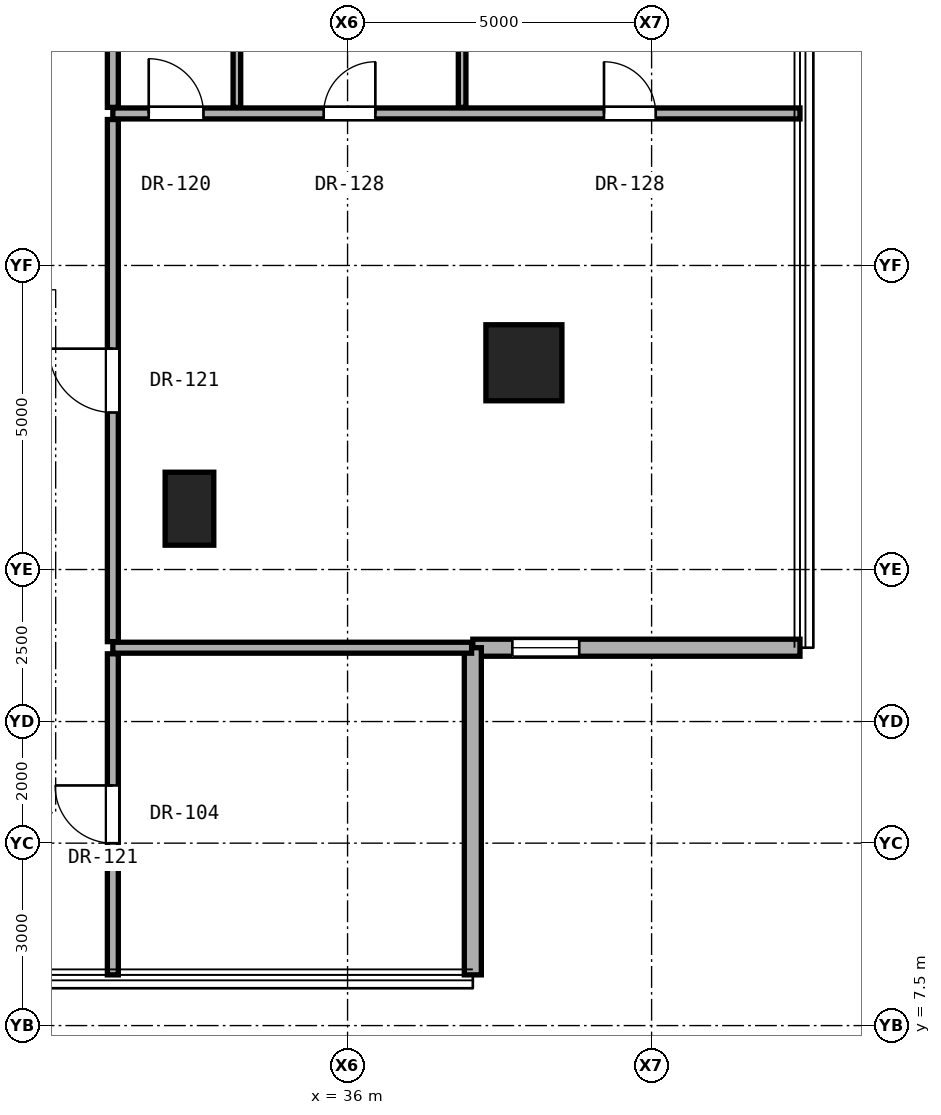
"""IFC4 building model, lengths in metres.
Left out: names, types, materials, properties, quantities, classifications, styles, units other than length and angle.
Written with IfcOpenShell. Run it as: python <this file> out.ifc"""

import sys

from ifc_helpers import new_model, si_unit, direction, frame, frame_2d, origin, origin_2d, place, context, subcontext, project, spatial, rectangle, hollow_rectangle, extrude, element, fill, save


model = new_model("IFC4")
c1 = context("Model", 3, precision=1e-05, world=origin(), true_north=direction((0.0, 1.0)))
c2 = subcontext(c1, "Body", "Model", "MODEL_VIEW")
j1 = project(units=[si_unit("LENGTHUNIT", "METRE"), si_unit("PLANEANGLEUNIT", "RADIAN")], contexts=[c1])
p1 = place(None, origin())
s1 = spatial("IfcSite", under=j1, at=p1, CompositionType="ELEMENT")
p2 = place(p1, origin())
s2 = spatial("IfcBuilding", under=s1, at=p2, CompositionType="ELEMENT")
p3 = place(p2, frame((0.0, 0.0, 45.5)))
s3 = spatial("IfcBuildingStorey", under=s2, at=p3, CompositionType="ELEMENT", Elevation=45.5)
p4 = place(p3, frame((38.9, 18.4, 0.0), z_axis=(0.0, 0.0, 1.0), x_axis=(1.0, 0.0, 0.0)))
e1 = element("IfcColumn", 1, at=p4, inside=s3, PredefinedType="COLUMN", context=c2, shape_type="SweptSolid", body=[
    extrude(hollow_rectangle(XDim=1.25, YDim=1.25, WallThickness=0.07, at=origin_2d()), origin(), (0.0, 0.0, 1.0), 3.3),
])
p5 = place(p3, frame((33.4, 16.0, 0.0), z_axis=(0.0, 0.0, 1.0), x_axis=(1.0, 0.0, 0.0)))
e2 = element("IfcColumn", 2, at=p5, inside=s3, PredefinedType="PILASTER", context=c2, shape_type="SweptSolid", body=[
    extrude(rectangle(XDim=0.8, YDim=1.2, at=origin_2d()), origin(), (0.0, 0.0, 1.0), 3.3),
])
p6 = place(p3, frame((38.06, 13.714, 0.0), z_axis=(0.0, 0.0, 1.0), x_axis=(1.0, 0.0, 0.0)))
e3 = element("IfcWall", 3, at=p6, inside=s3, PredefinedType="SOLIDWALL", context=c2, shape_type="SweptSolid", body=[
    extrude(rectangle(XDim=5.38, YDim=0.28, at=frame_2d((2.69, 0.0))), origin(), (0.0, 0.0, 1.0), 3.04),
])
p7 = place(p6, frame((0.65, 0.0, 0.85)))
e4 = element("IfcOpeningElement", 4, at=p7, cuts=e3, PredefinedType="OPENING", context=c2, shape_type="SweptSolid", body=[
    extrude(rectangle(XDim=1.1, YDim=2.0, at=frame_2d((0.55, 1.0))), frame((0.0, 0.15, 0.0), z_axis=(0.0, -1.0, 0.0), x_axis=(1.0, 0.0, 0.0)), (0.0, 0.0, 1.0), 0.3),
])
p8 = place(p3, frame((38.06, 8.334, 0.0), z_axis=(0.0, 0.0, 1.0), x_axis=(0.0, 1.0, 0.0)))
e5 = element("IfcWall", 5, at=p8, inside=s3, PredefinedType="SOLIDWALL", context=c2, shape_type="SweptSolid", body=[
    extrude(rectangle(XDim=5.38, YDim=0.28, at=frame_2d((2.69, 0.0))), origin(), (0.0, 0.0, 1.0), 3.04),
])
p9 = place(p3, frame((32.14, 13.714, 0.0), z_axis=(0.0, 0.0, 1.0), x_axis=(1.0, 0.0, 0.0)))
e6 = element("IfcWall", 6, at=p9, inside=s3, PredefinedType="PARTITIONING", context=c2, shape_type="SweptSolid", body=[
    extrude(rectangle(XDim=5.9, YDim=0.18, at=frame_2d((2.95, 0.0))), origin(), (0.0, 0.0, 1.0), 3.06),
])
p10 = place(p3, frame((32.14, 22.5, 0.0), z_axis=(0.0, 0.0, 1.0), x_axis=(1.0, 0.0, 0.0)))
e7 = element("IfcWall", 7, at=p10, inside=s3, PredefinedType="PARTITIONING", context=c2, shape_type="SweptSolid", body=[
    extrude(rectangle(XDim=11.3, YDim=0.18, at=frame_2d((5.65, 0.0))), origin(), (0.0, 0.0, 1.0), 2.125),
])
p11 = place(p10, frame((8.077, 0.0, 0.0)))
e8 = element("IfcOpeningElement", 8, at=p11, cuts=e7, PredefinedType="OPENING", context=c2, shape_type="SweptSolid", body=[
    extrude(rectangle(XDim=0.85, YDim=2.01, at=frame_2d((0.425, 1.005))), frame((0.0, 0.1, 0.0), z_axis=(0.0, -1.0, 0.0), x_axis=(1.0, 0.0, 0.0)), (0.0, 0.0, 1.0), 0.2),
])
p12 = place(p10, frame((3.467, 0.0, 0.0)))
e9 = element("IfcOpeningElement", 9, at=p12, cuts=e7, PredefinedType="OPENING", context=c2, shape_type="SweptSolid", body=[
    extrude(rectangle(XDim=0.85, YDim=2.01, at=frame_2d((0.425, 1.005))), frame((0.0, 0.1, 0.0), z_axis=(0.0, -1.0, 0.0), x_axis=(1.0, 0.0, 0.0)), (0.0, 0.0, 1.0), 0.2),
])
p13 = place(p10, frame((0.59, 0.0, 0.0)))
e10 = element("IfcOpeningElement", 10, at=p13, cuts=e7, PredefinedType="OPENING", context=c2, shape_type="SweptSolid", body=[
    extrude(rectangle(XDim=0.9, YDim=2.1, at=frame_2d((0.45, 1.05))), frame((0.0, 0.1, 0.0), z_axis=(0.0, -1.0, 0.0), x_axis=(1.0, 0.0, 0.0)), (0.0, 0.0, 1.0), 0.2),
])
p14 = place(p3, frame((32.14, 8.334, 0.0), z_axis=(0.0, 0.0, 1.0), x_axis=(0.0, 1.0, 0.0)))
e11 = element("IfcWall", 11, at=p14, inside=s3, PredefinedType="PARTITIONING", context=c2, shape_type="SweptSolid", body=[
    extrude(rectangle(XDim=5.28, YDim=0.18, at=frame_2d((2.64, 0.0))), origin(), (0.0, 0.0, 1.0), 3.06),
])
p15 = place(p14, frame((2.165, 0.0, 0.0)))
e12 = element("IfcOpeningElement", 12, at=p15, cuts=e11, PredefinedType="OPENING", context=c2, shape_type="SweptSolid", body=[
    extrude(rectangle(XDim=0.95, YDim=2.15, at=frame_2d((0.475, 1.075))), frame((0.0, 0.1, 0.0), z_axis=(0.0, -1.0, 0.0), x_axis=(1.0, 0.0, 0.0)), (0.0, 0.0, 1.0), 0.2),
])
p16 = place(p3, frame((32.14, 13.814, 0.0), z_axis=(0.0, 0.0, 1.0), x_axis=(0.0, 1.0, 0.0)))
e13 = element("IfcWall", 13, at=p16, inside=s3, PredefinedType="PARTITIONING", context=c2, shape_type="SweptSolid", body=[
    extrude(rectangle(XDim=8.586, YDim=0.18, at=frame_2d((4.293, 0.0))), origin(), (0.0, 0.0, 1.0), 2.436),
])
p17 = place(p16, frame((3.768, 0.0, 0.0)))
e14 = element("IfcOpeningElement", 14, at=p17, cuts=e13, PredefinedType="OPENING", context=c2, shape_type="SweptSolid", body=[
    extrude(rectangle(XDim=1.05, YDim=2.2, at=frame_2d((0.525, 1.1))), frame((0.0, 0.1, 0.0), z_axis=(0.0, -1.0, 0.0), x_axis=(1.0, 0.0, 0.0)), (0.0, 0.0, 1.0), 0.2),
])
p18 = place(p3, frame((32.14, 22.6, 0.0), z_axis=(0.0, 0.0, 1.0), x_axis=(0.0, 1.0, 0.0)))
e15 = element("IfcWall", 15, at=p18, inside=s3, PredefinedType="PARTITIONING", context=c2, shape_type="SweptSolid", body=[
    extrude(rectangle(XDim=2.127, YDim=0.18, at=frame_2d((1.064, 0.0))), origin(), (0.0, 0.0, 1.0), 2.279),
])
for number, where, z_axis, x_axis in (
    (16, (34.18, 22.6, 0.0), (0.0, 0.0, 1.0), (0.0, 1.0, 0.0)),
    (17, (37.884, 22.6, 0.0), (0.0, 0.0, 1.0), (0.0, 1.0, 0.0)),
):
    element("IfcWall", number, at=place(p3, frame(where, z_axis=z_axis, x_axis=x_axis)), inside=s3, PredefinedType="PARTITIONING", context=c2, shape_type="SweptSolid", body=[
        extrude(rectangle(XDim=2.127, YDim=0.125, at=frame_2d((1.064, 0.0))), origin(), (0.0, 0.0, 1.0), 2.279),
    ])
p19 = place(p7, origin())
e18 = element("IfcWindow", 18, at=p19, inside=s3, PartitioningType="SINGLE_PANEL", PredefinedType="WINDOW", context=c2, shape_type="SweptSolid", body=[
    extrude(rectangle(XDim=1.1, YDim=2.0, at=frame_2d((0.55, 1.0))), frame((0.0, 0.03, 0.0), z_axis=(0.0, -1.0, 0.0), x_axis=(1.0, 0.0, 0.0)), (0.0, 0.0, 1.0), 0.06),
])
fill(e4, e18)
p20 = place(p17, origin())
e19 = element("IfcDoor", 19, at=p20, inside=s3, OperationType="SINGLE_SWING_RIGHT", PredefinedType="DOOR", context=c2, shape_type="SweptSolid", body=[
    extrude(rectangle(XDim=1.05, YDim=2.2, at=frame_2d((0.525, 1.1))), frame((0.0, 0.025, 0.0), z_axis=(0.0, -1.0, 0.0), x_axis=(1.0, 0.0, 0.0)), (0.0, 0.0, 1.0), 0.05),
])
fill(e14, e19)
p21 = place(p11, origin())
e20 = element("IfcDoor", 20, at=p21, inside=s3, OperationType="SINGLE_SWING_LEFT", PredefinedType="DOOR", context=c2, shape_type="SweptSolid", body=[
    extrude(rectangle(XDim=0.85, YDim=2.01, at=frame_2d((0.425, 1.005))), frame((0.0, 0.025, 0.0), z_axis=(0.0, -1.0, 0.0), x_axis=(1.0, 0.0, 0.0)), (0.0, 0.0, 1.0), 0.05),
])
fill(e8, e20)
p22 = place(p12, origin())
e21 = element("IfcDoor", 21, at=p22, inside=s3, OperationType="SINGLE_SWING_RIGHT", PredefinedType="DOOR", context=c2, shape_type="SweptSolid", body=[
    extrude(rectangle(XDim=0.85, YDim=2.01, at=frame_2d((0.425, 1.005))), frame((0.0, 0.025, 0.0), z_axis=(0.0, -1.0, 0.0), x_axis=(1.0, 0.0, 0.0)), (0.0, 0.0, 1.0), 0.05),
])
fill(e9, e21)
p23 = place(p13, origin())
e22 = element("IfcDoor", 22, at=p23, inside=s3, OperationType="SINGLE_SWING_LEFT", PredefinedType="DOOR", context=c2, shape_type="SweptSolid", body=[
    extrude(rectangle(XDim=0.9, YDim=2.1, at=frame_2d((0.45, 1.05))), frame((0.0, 0.025, 0.0), z_axis=(0.0, -1.0, 0.0), x_axis=(1.0, 0.0, 0.0)), (0.0, 0.0, 1.0), 0.05),
])
fill(e10, e22)
p24 = place(p15, origin())
e23 = element("IfcDoor", 23, at=p24, inside=s3, OperationType="SINGLE_SWING_RIGHT", PredefinedType="DOOR", context=c2, shape_type="SweptSolid", body=[
    extrude(rectangle(XDim=0.95, YDim=2.15, at=frame_2d((0.475, 1.075))), frame((0.0, 0.025, 0.0), z_axis=(0.0, -1.0, 0.0), x_axis=(1.0, 0.0, 0.0)), (0.0, 0.0, 1.0), 0.05),
])
fill(e12, e23)
save(model, sys.argv[1])
